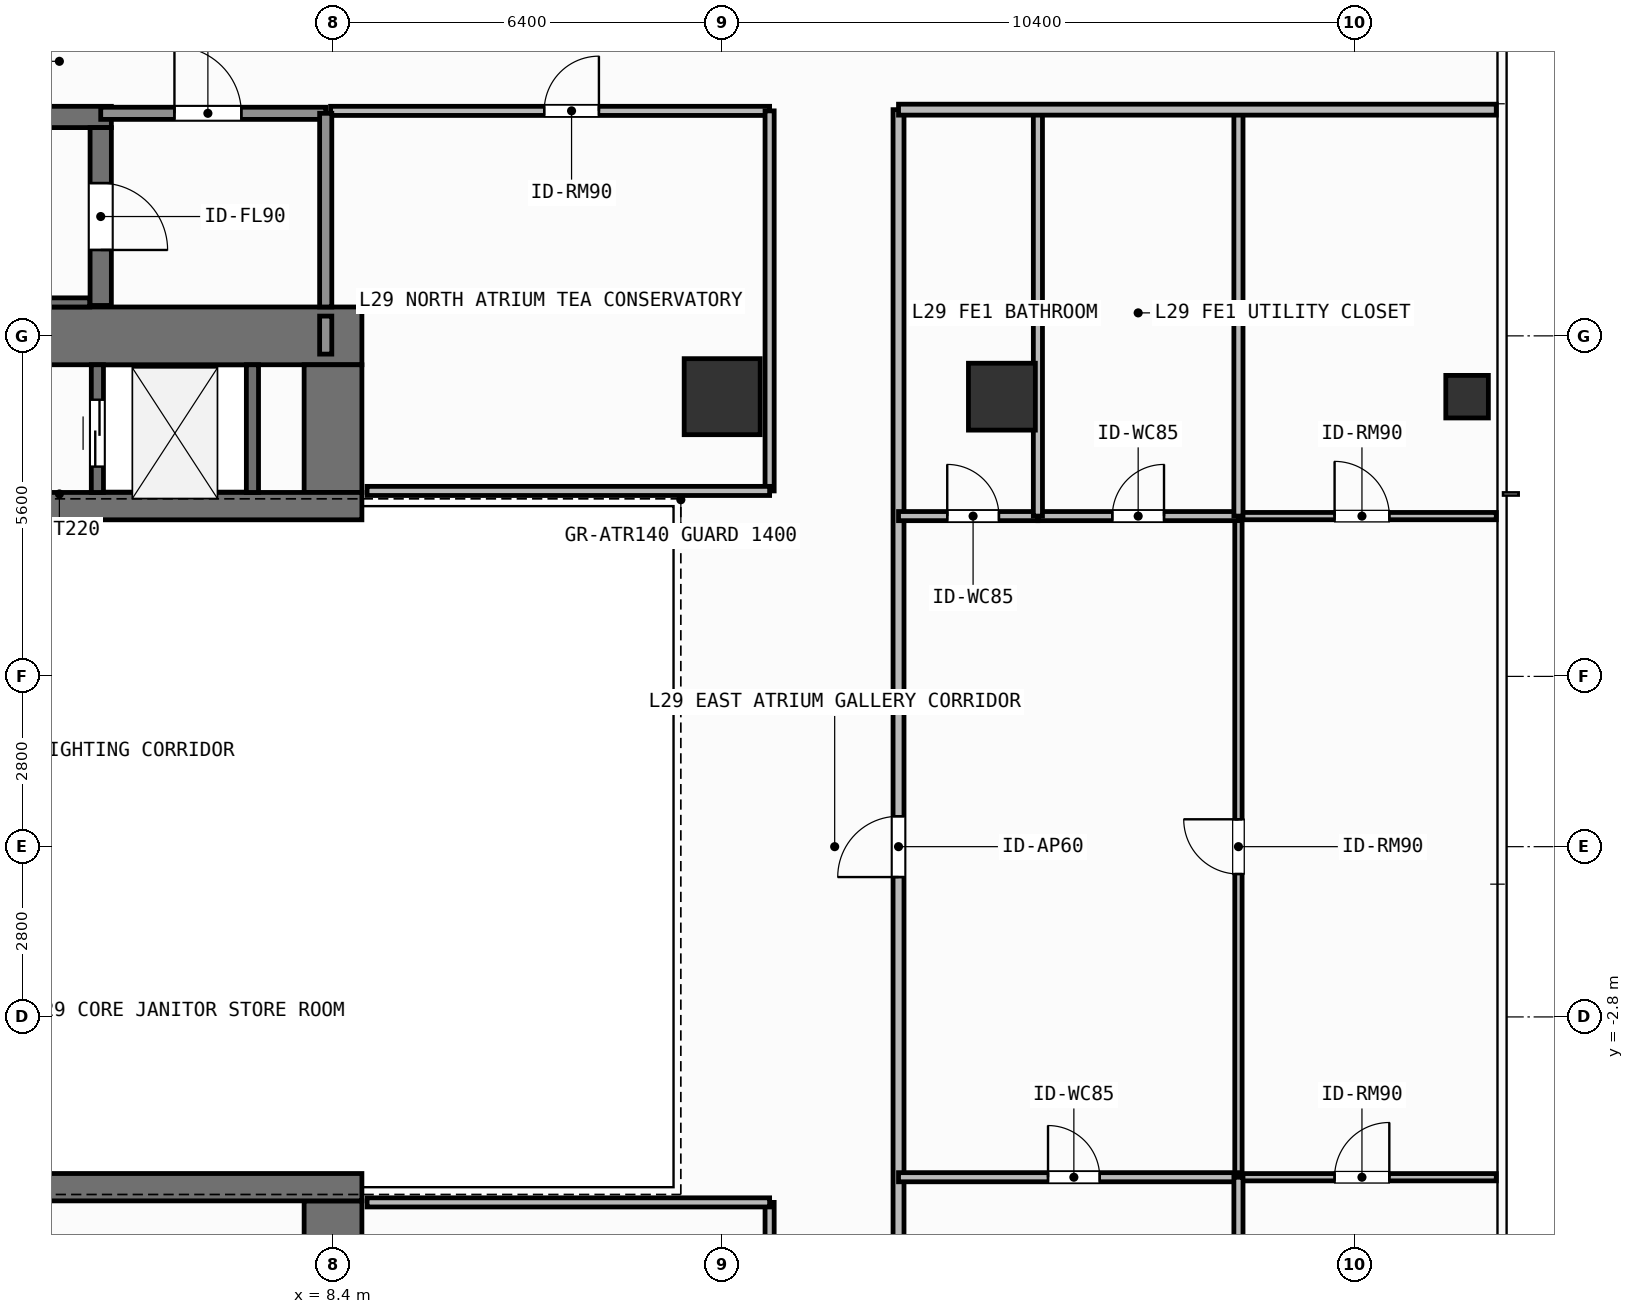
"""IFC4 building model, lengths in metres.
Left out: names, types, materials, properties, quantities, classifications, styles, units other than length and angle.
Written with IfcOpenShell. Run it as: python <this file> out.ifc"""

import sys

from ifc_helpers import new_model, si_unit, direction, frame, frame_2d, origin, origin_2d, place, context, subcontext, project, spatial, rectangle, hollow_rectangle, extrude, element, fill, save


model = new_model("IFC4")
c1 = context("Model", 3, precision=1e-05, world=origin(), true_north=direction((0.0, 1.0)))
c2 = subcontext(c1, "Body", "Model", "MODEL_VIEW")
j1 = project(units=[si_unit("LENGTHUNIT", "METRE"), si_unit("PLANEANGLEUNIT", "RADIAN")], contexts=[c1])
p1 = place(None, origin())
s1 = spatial("IfcSite", under=j1, at=p1, CompositionType="ELEMENT")
p2 = place(p1, origin())
s2 = spatial("IfcBuilding", under=s1, at=p2, CompositionType="ELEMENT")
p3 = place(p2, frame((0.0, 0.0, 117.3)))
s3 = spatial("IfcBuildingStorey", under=s2, at=p3, CompositionType="ELEMENT", Elevation=117.3)
p4 = place(p3, frame((-7.55, 8.4, 0.0), z_axis=(0.0, 0.0, 1.0), x_axis=(1.0, 0.0, 0.0)))
e1 = element("IfcWall", 1, at=p4, inside=s3, PredefinedType="SHEAR", context=c2, shape_type="SweptSolid", body=[
    extrude(rectangle(XDim=16.425, YDim=0.95, at=frame_2d((8.212, 0.0))), origin(), (0.0, 0.0, 1.0), 3.9),
])
for number, where, z_axis, x_axis in (
    (2, (8.4, -7.925, 0.0), (0.0, 0.0, 1.0), (0.0, 1.0, 0.0)),
    (3, (8.4, 5.825, 0.0), (0.0, 0.0, 1.0), (0.0, 1.0, 0.0)),
):
    element("IfcWall", number, at=place(p3, frame(where, z_axis=z_axis, x_axis=x_axis)), inside=s3, PredefinedType="SHEAR", context=c2, shape_type="SweptSolid", body=[
        extrude(rectangle(XDim=2.1, YDim=0.95, at=frame_2d((1.05, 0.0))), origin(), (0.0, 0.0, 1.0), 3.9),
    ])
for number, where, z_axis, x_axis in (
    (4, (3.045, -5.6, 0.0), (0.0, 0.0, 1.0), (1.0, 0.0, 0.0)),
    (5, (3.045, 5.6, 0.0), (0.0, 0.0, 1.0), (1.0, 0.0, 0.0)),
):
    element("IfcWall", number, at=place(p3, frame(where, z_axis=z_axis, x_axis=x_axis)), inside=s3, PredefinedType="SHEAR", context=c2, shape_type="SweptSolid", body=[
        extrude(rectangle(XDim=5.83, YDim=0.45, at=frame_2d((2.915, 0.0))), origin(), (0.0, 0.0, 1.0), 3.9),
    ])
p5 = place(p3, frame((-2.555, 12.0, 0.0), z_axis=(0.0, 0.0, 1.0), x_axis=(1.0, 0.0, 0.0)))
e6 = element("IfcWall", 6, at=p5, inside=s3, PredefinedType="SHEAR", context=c2, shape_type="SweptSolid", body=[
    extrude(rectangle(XDim=7.31, YDim=0.35, at=frame_2d((3.655, 0.0))), origin(), (0.0, 0.0, 1.0), 3.9),
])
p6 = place(p3, frame((-2.2, 8.95, 0.0), z_axis=(0.0, 0.0, 1.0), x_axis=(1.0, 0.0, 0.0)))
e7 = element("IfcWall", 7, at=p6, inside=s3, PredefinedType="SHEAR", context=c2, shape_type="SweptSolid", body=[
    extrude(rectangle(XDim=6.6, YDim=0.15, at=frame_2d((3.3, 0.0))), origin(), (0.0, 0.0, 1.0), 3.9),
])
p7 = place(p3, frame((4.58, 11.825, 0.0), z_axis=(0.0, 0.0, 1.0), x_axis=(0.0, -1.0, 0.0)))
e8 = element("IfcWall", 8, at=p7, inside=s3, PredefinedType="SHEAR", context=c2, shape_type="SweptSolid", body=[
    extrude(rectangle(XDim=2.925, YDim=0.35, at=frame_2d((1.462, 0.0))), origin(), (0.0, 0.0, 1.0), 3.9),
])
p8 = place(p7, frame((0.913, 0.0, 0.0)))
e9 = element("IfcOpeningElement", 9, at=p8, cuts=e8, PredefinedType="OPENING", context=c2, shape_type="SweptSolid", body=[
    extrude(rectangle(XDim=1.1, YDim=2.15, at=frame_2d((0.55, 1.075))), frame((0.0, 0.185, 0.0), z_axis=(0.0, -1.0, 0.0), x_axis=(1.0, 0.0, 0.0)), (0.0, 0.0, 1.0), 0.37),
])
p9 = place(p3, frame((14.8, 7.4, 0.0), z_axis=(0.0, 0.0, 1.0), x_axis=(1.0, 0.0, 0.0)))
e10 = element("IfcColumn", 10, at=p9, inside=s3, PredefinedType="COLUMN", context=c2, shape_type="SweptSolid", body=[
    extrude(rectangle(XDim=1.25, YDim=1.25, at=origin_2d()), origin(), (0.0, 0.0, 1.0), 3.9),
])
p10 = place(p3, frame((19.4, 7.4, 0.0), z_axis=(0.0, 0.0, 1.0), x_axis=(1.0, 0.0, 0.0)))
e11 = element("IfcColumn", 11, at=p10, inside=s3, PredefinedType="COLUMN", context=c2, shape_type="SweptSolid", body=[
    extrude(rectangle(XDim=1.1, YDim=1.1, at=origin_2d()), origin(), (0.0, 0.0, 1.0), 3.9),
])
p11 = place(p3, frame((27.05, 7.4, 0.0), z_axis=(0.0, 0.0, 1.0), x_axis=(1.0, 0.0, 0.0)))
e12 = element("IfcColumn", 12, at=p11, inside=s3, PredefinedType="COLUMN", context=c2, shape_type="SweptSolid", body=[
    extrude(hollow_rectangle(XDim=0.7, YDim=0.7, WallThickness=0.032, at=origin_2d()), origin(), (0.0, 0.0, 1.0), 3.9),
])
p12 = place(p3, frame((4.525, 5.825, 0.0), z_axis=(0.0, 0.0, 1.0), x_axis=(0.0, 1.0, 0.0)))
e13 = element("IfcWall", 13, at=p12, inside=s3, PredefinedType="SHEAR", context=c2, shape_type="SweptSolid", body=[
    extrude(rectangle(XDim=2.1, YDim=0.2, at=frame_2d((1.05, 0.0))), origin(), (0.0, 0.0, 1.0), 3.68),
])
p13 = place(p12, frame((0.425, 0.0, 0.0)))
e14 = element("IfcOpeningElement", 14, at=p13, cuts=e13, PredefinedType="OPENING", context=c2, shape_type="SweptSolid", body=[
    extrude(rectangle(XDim=1.1, YDim=2.2, at=frame_2d((0.55, 1.1))), frame((0.0, 0.11, 0.0), z_axis=(0.0, -1.0, 0.0), x_axis=(1.0, 0.0, 0.0)), (0.0, 0.0, 1.0), 0.22),
])
p14 = place(p3, frame((7.075, 5.825, 0.0), z_axis=(0.0, 0.0, 1.0), x_axis=(0.0, 1.0, 0.0)))
e15 = element("IfcWall", 15, at=p14, inside=s3, PredefinedType="SHEAR", context=c2, shape_type="SweptSolid", body=[
    extrude(rectangle(XDim=2.1, YDim=0.2, at=frame_2d((1.05, 0.0))), origin(), (0.0, 0.0, 1.0), 3.68),
])
p15 = place(p3, frame((4.58, 12.06, 0.0), z_axis=(0.0, 0.0, 1.0), x_axis=(1.0, 0.0, 0.0)))
e16 = element("IfcWall", 16, at=p15, inside=s3, PredefinedType="SOLIDWALL", context=c2, shape_type="SweptSolid", body=[
    extrude(rectangle(XDim=3.7, YDim=0.2, at=frame_2d((1.85, 0.0))), origin(), (0.0, 0.0, 1.0), 3.68),
])
p16 = place(p15, frame((1.212, 0.0, 0.0)))
e17 = element("IfcOpeningElement", 17, at=p16, cuts=e16, PredefinedType="OPENING", context=c2, shape_type="SweptSolid", body=[
    extrude(rectangle(XDim=1.1, YDim=2.15, at=frame_2d((0.55, 1.075))), frame((0.0, 0.11, 0.0), z_axis=(0.0, -1.0, 0.0), x_axis=(1.0, 0.0, 0.0)), (0.0, 0.0, 1.0), 0.22),
])
p17 = place(p3, frame((8.36, 12.1, 0.0), z_axis=(0.0, 0.0, 1.0), x_axis=(1.0, 0.0, 0.0)))
e18 = element("IfcWall", 18, at=p17, inside=s3, PredefinedType="PARTITIONING", context=c2, shape_type="SweptSolid", body=[
    extrude(rectangle(XDim=7.22, YDim=0.15, at=frame_2d((3.61, 0.0))), origin(), (0.0, 0.0, 1.0), 3.68),
])
p18 = place(p17, frame((3.513, 0.0, 0.0)))
e19 = element("IfcOpeningElement", 19, at=p18, cuts=e18, PredefinedType="OPENING", context=c2, shape_type="SweptSolid", body=[
    extrude(rectangle(XDim=0.9, YDim=2.1, at=frame_2d((0.45, 1.05))), frame((0.0, 0.085, 0.0), z_axis=(0.0, -1.0, 0.0), x_axis=(1.0, 0.0, 0.0)), (0.0, 0.0, 1.0), 0.17),
])
p19 = place(p3, frame((17.7, -12.12, 0.0), z_axis=(0.0, 0.0, 1.0), x_axis=(0.0, 1.0, 0.0)))
e20 = element("IfcWall", 20, at=p19, inside=s3, PredefinedType="PARTITIONING", context=c2, shape_type="SweptSolid", body=[
    extrude(rectangle(XDim=24.24, YDim=0.18, at=frame_2d((12.12, 0.0))), origin(), (0.0, 0.0, 1.0), 3.68),
])
p20 = place(p19, frame((11.62, 0.0, 0.0)))
e21 = element("IfcOpeningElement", 21, at=p20, cuts=e20, PredefinedType="OPENING", context=c2, shape_type="SweptSolid", body=[
    extrude(rectangle(XDim=1.0, YDim=2.2, at=frame_2d((0.5, 1.1))), frame((0.0, 0.1, 0.0), z_axis=(0.0, -1.0, 0.0), x_axis=(1.0, 0.0, 0.0)), (0.0, 0.0, 1.0), 0.2),
])
p21 = place(p3, frame((23.29, -5.436, 0.0), z_axis=(0.0, 0.0, 1.0), x_axis=(0.0, 1.0, 0.0)))
e22 = element("IfcWall", 22, at=p21, inside=s3, PredefinedType="PARTITIONING", context=c2, shape_type="SweptSolid", body=[
    extrude(rectangle(XDim=10.872, YDim=0.12, at=frame_2d((5.436, 0.0))), origin(), (0.0, 0.0, 1.0), 3.68),
])
p22 = place(p21, frame((4.986, 0.0, 0.0)))
e23 = element("IfcOpeningElement", 23, at=p22, cuts=e22, PredefinedType="OPENING", context=c2, shape_type="SweptSolid", body=[
    extrude(rectangle(XDim=0.9, YDim=2.1, at=frame_2d((0.45, 1.05))), frame((0.0, 0.07, 0.0), z_axis=(0.0, -1.0, 0.0), x_axis=(1.0, 0.0, 0.0)), (0.0, 0.0, 1.0), 0.14),
])
p23 = place(p3, frame((17.7, 5.436, 0.0), z_axis=(0.0, 0.0, 1.0), x_axis=(1.0, 0.0, 0.0)))
e24 = element("IfcWall", 24, at=p23, inside=s3, PredefinedType="PARTITIONING", context=c2, shape_type="SweptSolid", body=[
    extrude(rectangle(XDim=2.292, YDim=0.15, at=frame_2d((1.146, 0.0))), origin(), (0.0, 0.0, 1.0), 3.68),
])
p24 = place(p23, frame((0.801, 0.0, 0.0)))
e25 = element("IfcOpeningElement", 25, at=p24, cuts=e24, PredefinedType="OPENING", context=c2, shape_type="SweptSolid", body=[
    extrude(rectangle(XDim=0.85, YDim=2.1, at=frame_2d((0.425, 1.05))), frame((0.0, 0.085, 0.0), z_axis=(0.0, -1.0, 0.0), x_axis=(1.0, 0.0, 0.0)), (0.0, 0.0, 1.0), 0.17),
])
p25 = place(p3, frame((19.992, 5.436, 0.0), z_axis=(0.0, 0.0, 1.0), x_axis=(1.0, 0.0, 0.0)))
e26 = element("IfcWall", 26, at=p25, inside=s3, PredefinedType="PARTITIONING", context=c2, shape_type="SweptSolid", body=[
    extrude(rectangle(XDim=3.298, YDim=0.15, at=frame_2d((1.649, 0.0))), origin(), (0.0, 0.0, 1.0), 3.68),
])
p26 = place(p25, frame((1.224, 0.0, 0.0)))
e27 = element("IfcOpeningElement", 27, at=p26, cuts=e26, PredefinedType="OPENING", context=c2, shape_type="SweptSolid", body=[
    extrude(rectangle(XDim=0.85, YDim=2.1, at=frame_2d((0.425, 1.05))), frame((0.0, 0.085, 0.0), z_axis=(0.0, -1.0, 0.0), x_axis=(1.0, 0.0, 0.0)), (0.0, 0.0, 1.0), 0.17),
])
p27 = place(p3, frame((17.7, -5.436, 0.0), z_axis=(0.0, 0.0, 1.0), x_axis=(1.0, 0.0, 0.0)))
e28 = element("IfcWall", 28, at=p27, inside=s3, PredefinedType="PARTITIONING", context=c2, shape_type="SweptSolid", body=[
    extrude(rectangle(XDim=5.59, YDim=0.15, at=frame_2d((2.795, 0.0))), origin(), (0.0, 0.0, 1.0), 3.68),
])
p28 = place(p27, frame((2.458, 0.0, 0.0)))
e29 = element("IfcOpeningElement", 29, at=p28, cuts=e28, PredefinedType="OPENING", context=c2, shape_type="SweptSolid", body=[
    extrude(rectangle(XDim=0.85, YDim=2.1, at=frame_2d((0.425, 1.05))), frame((0.0, 0.085, 0.0), z_axis=(0.0, -1.0, 0.0), x_axis=(1.0, 0.0, 0.0)), (0.0, 0.0, 1.0), 0.17),
])
p29 = place(p3, frame((23.29, -5.436, 0.0), z_axis=(0.0, 0.0, 1.0), x_axis=(1.0, 0.0, 0.0)))
e30 = element("IfcWall", 30, at=p29, inside=s3, PredefinedType="PARTITIONING", context=c2, shape_type="SweptSolid", body=[
    extrude(rectangle(XDim=4.24, YDim=0.12, at=frame_2d((2.12, 0.0))), origin(), (0.0, 0.0, 1.0), 3.68),
])
p30 = place(p29, frame((1.581, 0.0, 0.0)))
e31 = element("IfcOpeningElement", 31, at=p30, cuts=e30, PredefinedType="OPENING", context=c2, shape_type="SweptSolid", body=[
    extrude(rectangle(XDim=0.9, YDim=2.1, at=frame_2d((0.45, 1.05))), frame((0.0, 0.07, 0.0), z_axis=(0.0, -1.0, 0.0), x_axis=(1.0, 0.0, 0.0)), (0.0, 0.0, 1.0), 0.14),
])
p31 = place(p3, frame((23.29, 5.436, 0.0), z_axis=(0.0, 0.0, 1.0), x_axis=(1.0, 0.0, 0.0)))
e32 = element("IfcWall", 32, at=p31, inside=s3, PredefinedType="PARTITIONING", context=c2, shape_type="SweptSolid", body=[
    extrude(rectangle(XDim=4.24, YDim=0.12, at=frame_2d((2.12, 0.0))), origin(), (0.0, 0.0, 1.0), 3.68),
])
p32 = place(p31, frame((1.581, 0.0, 0.0)))
e33 = element("IfcOpeningElement", 33, at=p32, cuts=e32, PredefinedType="OPENING", context=c2, shape_type="SweptSolid", body=[
    extrude(rectangle(XDim=0.9, YDim=2.1, at=frame_2d((0.45, 1.05))), frame((0.0, 0.07, 0.0), z_axis=(0.0, -1.0, 0.0), x_axis=(1.0, 0.0, 0.0)), (0.0, 0.0, 1.0), 0.14),
])
p33 = place(p3, frame((8.28, 8.875, 0.0), z_axis=(0.0, 0.0, 1.0), x_axis=(0.0, 1.0, 0.0)))
e34 = element("IfcWall", 34, at=p33, inside=s3, PredefinedType="SOLIDWALL", context=c2, shape_type="SweptSolid", body=[
    extrude(rectangle(XDim=3.185, YDim=0.2, at=frame_2d((1.593, 0.0))), origin(), (0.0, 0.0, 1.0), 3.68),
])
p34 = place(p3, frame((15.58, -12.1, 0.0), z_axis=(0.0, 0.0, 1.0), x_axis=(0.0, 1.0, 0.0)))
e35 = element("IfcWall", 35, at=p34, inside=s3, PredefinedType="PARTITIONING", context=c2, shape_type="SweptSolid", body=[
    extrude(rectangle(XDim=6.25, YDim=0.15, at=frame_2d((3.125, 0.0))), origin(), (0.0, 0.0, 1.0), 3.68),
])
p35 = place(p3, frame((8.96, -5.85, 0.0), z_axis=(0.0, 0.0, 1.0), x_axis=(1.0, 0.0, 0.0)))
e36 = element("IfcWall", 36, at=p35, inside=s3, PredefinedType="PARTITIONING", context=c2, shape_type="SweptSolid", body=[
    extrude(rectangle(XDim=6.62, YDim=0.15, at=frame_2d((3.31, 0.0))), origin(), (0.0, 0.0, 1.0), 3.68),
])
p36 = place(p3, frame((8.28, 8.1, 0.0), z_axis=(0.0, 0.0, 1.0), x_axis=(0.0, 1.0, 0.0)))
e37 = element("IfcWall", 37, at=p36, inside=s3, PredefinedType="SOLIDWALL", context=c2, shape_type="SweptSolid", body=[
    extrude(rectangle(XDim=0.625, YDim=0.2, at=frame_2d((0.312, 0.0))), origin(), (0.0, 0.0, 1.0), 3.68),
])
p37 = place(p3, frame((15.58, 5.85, 0.0), z_axis=(0.0, 0.0, 1.0), x_axis=(0.0, 1.0, 0.0)))
e38 = element("IfcWall", 38, at=p37, inside=s3, PredefinedType="PARTITIONING", context=c2, shape_type="SweptSolid", body=[
    extrude(rectangle(XDim=6.25, YDim=0.15, at=frame_2d((3.125, 0.0))), origin(), (0.0, 0.0, 1.0), 3.68),
])
p38 = place(p3, frame((8.96, 5.85, 0.0), z_axis=(0.0, 0.0, 1.0), x_axis=(1.0, 0.0, 0.0)))
e39 = element("IfcWall", 39, at=p38, inside=s3, PredefinedType="PARTITIONING", context=c2, shape_type="SweptSolid", body=[
    extrude(rectangle(XDim=6.62, YDim=0.15, at=frame_2d((3.31, 0.0))), origin(), (0.0, 0.0, 1.0), 3.68),
])
for number, where, z_axis, x_axis in (
    (40, (19.992, 5.436, 0.0), (0.0, 0.0, 1.0), (0.0, 1.0, 0.0)),
    (41, (23.29, -12.12, 0.0), (0.0, 0.0, 1.0), (0.0, 1.0, 0.0)),
    (42, (23.29, 5.436, 0.0), (0.0, 0.0, 1.0), (0.0, 1.0, 0.0)),
):
    element("IfcWall", number, at=place(p3, frame(where, z_axis=z_axis, x_axis=x_axis)), inside=s3, PredefinedType="PARTITIONING", context=c2, shape_type="SweptSolid", body=[
        extrude(rectangle(XDim=6.684, YDim=0.15, at=frame_2d((3.342, 0.0))), origin(), (0.0, 0.0, 1.0), 3.68),
    ])
p39 = place(p3, frame((17.7, 12.12, 0.0), z_axis=(0.0, 0.0, 1.0), x_axis=(1.0, 0.0, 0.0)))
e43 = element("IfcWall", 43, at=p39, inside=s3, PredefinedType="PARTITIONING", context=c2, shape_type="SweptSolid", body=[
    extrude(rectangle(XDim=9.83, YDim=0.18, at=frame_2d((4.915, 0.0))), origin(), (0.0, 0.0, 1.0), 3.68),
])
p40 = place(p13, origin())
e44 = element("IfcDoor", 44, at=p40, inside=s3, OperationType="SLIDING_TO_LEFT", PredefinedType="DOOR", context=c2, shape_type="SweptSolid", body=[
    extrude(rectangle(XDim=1.1, YDim=2.2, at=frame_2d((0.55, 1.1))), frame((0.0, 0.025, 0.0), z_axis=(0.0, -1.0, 0.0), x_axis=(1.0, 0.0, 0.0)), (0.0, 0.0, 1.0), 0.05),
])
fill(e14, e44)
p41 = place(p8, origin())
e45 = element("IfcDoor", 45, at=p41, inside=s3, OperationType="SINGLE_SWING_RIGHT", PredefinedType="DOOR", context=c2, shape_type="SweptSolid", body=[
    extrude(rectangle(XDim=1.1, YDim=2.15, at=frame_2d((0.55, 1.075))), frame((0.0, 0.025, 0.0), z_axis=(0.0, -1.0, 0.0), x_axis=(1.0, 0.0, 0.0)), (0.0, 0.0, 1.0), 0.05),
])
fill(e9, e45)
p42 = place(p16, origin())
e46 = element("IfcDoor", 46, at=p42, inside=s3, OperationType="SINGLE_SWING_LEFT", PredefinedType="DOOR", context=c2, shape_type="SweptSolid", body=[
    extrude(rectangle(XDim=1.1, YDim=2.15, at=frame_2d((0.55, 1.075))), frame((0.0, 0.025, 0.0), z_axis=(0.0, -1.0, 0.0), x_axis=(1.0, 0.0, 0.0)), (0.0, 0.0, 1.0), 0.05),
])
fill(e17, e46)
p43 = place(p18, origin())
e47 = element("IfcDoor", 47, at=p43, inside=s3, OperationType="SINGLE_SWING_RIGHT", PredefinedType="DOOR", context=c2, shape_type="SweptSolid", body=[
    extrude(rectangle(XDim=0.9, YDim=2.1, at=frame_2d((0.45, 1.05))), frame((0.0, 0.025, 0.0), z_axis=(0.0, -1.0, 0.0), x_axis=(1.0, 0.0, 0.0)), (0.0, 0.0, 1.0), 0.05),
])
fill(e19, e47)
p44 = place(p20, origin())
e48 = element("IfcDoor", 48, at=p44, inside=s3, OperationType="SINGLE_SWING_LEFT", PredefinedType="DOOR", context=c2, shape_type="SweptSolid", body=[
    extrude(rectangle(XDim=1.0, YDim=2.2, at=frame_2d((0.5, 1.1))), frame((0.0, 0.025, 0.0), z_axis=(0.0, -1.0, 0.0), x_axis=(1.0, 0.0, 0.0)), (0.0, 0.0, 1.0), 0.05),
])
fill(e21, e48)
p45 = place(p22, origin())
e49 = element("IfcDoor", 49, at=p45, inside=s3, OperationType="SINGLE_SWING_RIGHT", PredefinedType="DOOR", context=c2, shape_type="SweptSolid", body=[
    extrude(rectangle(XDim=0.9, YDim=2.1, at=frame_2d((0.45, 1.05))), frame((0.0, 0.025, 0.0), z_axis=(0.0, -1.0, 0.0), x_axis=(1.0, 0.0, 0.0)), (0.0, 0.0, 1.0), 0.05),
])
fill(e23, e49)
p46 = place(p24, origin())
e50 = element("IfcDoor", 50, at=p46, inside=s3, OperationType="SINGLE_SWING_LEFT", PredefinedType="DOOR", context=c2, shape_type="SweptSolid", body=[
    extrude(rectangle(XDim=0.85, YDim=2.1, at=frame_2d((0.425, 1.05))), frame((0.0, 0.025, 0.0), z_axis=(0.0, -1.0, 0.0), x_axis=(1.0, 0.0, 0.0)), (0.0, 0.0, 1.0), 0.05),
])
fill(e25, e50)
p47 = place(p26, origin())
e51 = element("IfcDoor", 51, at=p47, inside=s3, OperationType="SINGLE_SWING_RIGHT", PredefinedType="DOOR", context=c2, shape_type="SweptSolid", body=[
    extrude(rectangle(XDim=0.85, YDim=2.1, at=frame_2d((0.425, 1.05))), frame((0.0, 0.025, 0.0), z_axis=(0.0, -1.0, 0.0), x_axis=(1.0, 0.0, 0.0)), (0.0, 0.0, 1.0), 0.05),
])
fill(e27, e51)
p48 = place(p28, origin())
e52 = element("IfcDoor", 52, at=p48, inside=s3, OperationType="SINGLE_SWING_LEFT", PredefinedType="DOOR", context=c2, shape_type="SweptSolid", body=[
    extrude(rectangle(XDim=0.85, YDim=2.1, at=frame_2d((0.425, 1.05))), frame((0.0, 0.025, 0.0), z_axis=(0.0, -1.0, 0.0), x_axis=(1.0, 0.0, 0.0)), (0.0, 0.0, 1.0), 0.05),
])
fill(e29, e52)
p49 = place(p30, origin())
e53 = element("IfcDoor", 53, at=p49, inside=s3, OperationType="SINGLE_SWING_RIGHT", PredefinedType="DOOR", context=c2, shape_type="SweptSolid", body=[
    extrude(rectangle(XDim=0.9, YDim=2.1, at=frame_2d((0.45, 1.05))), frame((0.0, 0.025, 0.0), z_axis=(0.0, -1.0, 0.0), x_axis=(1.0, 0.0, 0.0)), (0.0, 0.0, 1.0), 0.05),
])
fill(e31, e53)
p50 = place(p32, origin())
e54 = element("IfcDoor", 54, at=p50, inside=s3, OperationType="SINGLE_SWING_LEFT", PredefinedType="DOOR", context=c2, shape_type="SweptSolid", body=[
    extrude(rectangle(XDim=0.9, YDim=2.1, at=frame_2d((0.45, 1.05))), frame((0.0, 0.025, 0.0), z_axis=(0.0, -1.0, 0.0), x_axis=(1.0, 0.0, 0.0)), (0.0, 0.0, 1.0), 0.05),
])
fill(e33, e54)
save(model, sys.argv[1])
